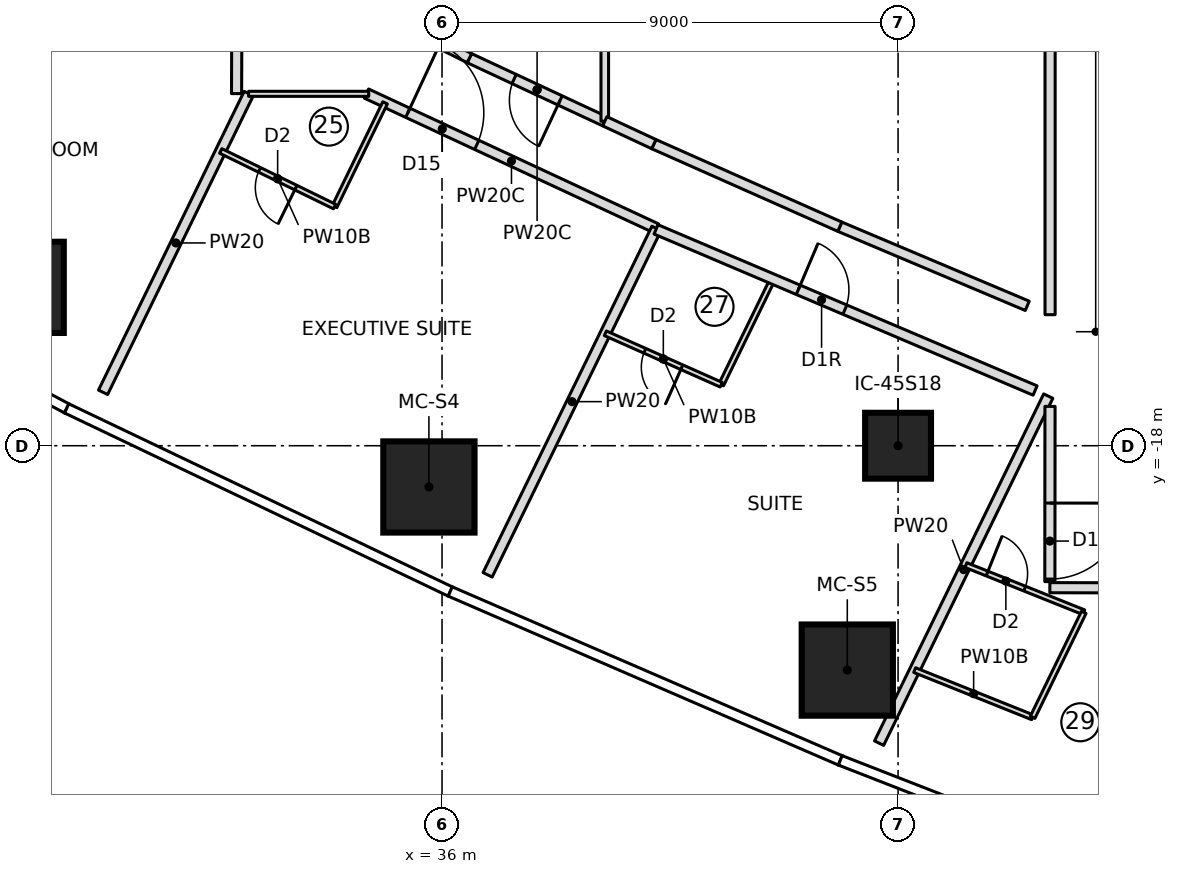
"""IFC4 building model, lengths in metres.
Left out: names, types, materials, properties, quantities, classifications, styles, units other than length and angle.
Written with IfcOpenShell. Run it as: python <this file> out.ifc"""

import sys

from ifc_helpers import new_model, si_unit, direction, frame, frame_2d, origin, origin_2d, place, context, subcontext, project, spatial, rectangle, extrude, element, fill, save


model = new_model("IFC4")
c1 = context("Model", 3, precision=1e-05, world=origin(), true_north=direction((0.0, 1.0)))
c2 = subcontext(c1, "Body", "Model", "MODEL_VIEW")
j1 = project(units=[si_unit("LENGTHUNIT", "METRE"), si_unit("PLANEANGLEUNIT", "RADIAN")], contexts=[c1])
p1 = place(None, origin())
s1 = spatial("IfcSite", under=j1, at=p1, CompositionType="ELEMENT")
p2 = place(p1, origin())
s2 = spatial("IfcBuilding", under=s1, at=p2, CompositionType="ELEMENT")
p3 = place(p2, frame((0.0, 0.0, 53.8)))
s3 = spatial("IfcBuildingStorey", under=s2, at=p3, CompositionType="ELEMENT", Elevation=53.8)
for number, where, z_axis, x_axis in (
    (1, (27.635, -14.874, 0.0), (0.0, 0.0, 1.0), (1.0, 0.0, 0.0)),
    (2, (35.741, -18.814, 0.0), (0.0, 0.0, 1.0), (1.0, 0.0, 0.0)),
    (3, (43.998, -22.428, 0.0), (0.0, 0.0, 1.0), (1.0, 0.0, 0.0)),
):
    element("IfcColumn", number, at=place(p3, frame(where, z_axis=z_axis, x_axis=x_axis)), inside=s3, PredefinedType="COLUMN", context=c2, shape_type="SweptSolid", body=[
        extrude(rectangle(XDim=1.8, YDim=1.8, at=origin_2d()), origin(), (0.0, 0.0, 1.0), 3.55),
    ])
p4 = place(p3, frame((45.0, -18.0, 0.0), z_axis=(0.0, 0.0, 1.0), x_axis=(1.0, 0.0, 0.0)))
e4 = element("IfcColumn", 4, at=p4, inside=s3, PredefinedType="COLUMN", context=c2, shape_type="SweptSolid", body=[
    extrude(rectangle(XDim=1.3, YDim=1.3, at=origin_2d()), origin(), (0.0, 0.0, 1.0), 3.55),
])
p5 = place(p3, frame((29.31, -16.946, 0.0), z_axis=(0.0, 0.0, 1.0), x_axis=(0.438228560869, 0.898863576099, 0.0)))
e5 = element("IfcWall", 5, at=p5, inside=s3, PredefinedType="PARTITIONING", context=c2, shape_type="SweptSolid", body=[
    extrude(rectangle(XDim=6.559, YDim=0.2, at=frame_2d((3.28, 0.0))), origin(), (0.0, 0.0, 1.0), 3.25),
])
p6 = place(p3, frame((34.509, -11.05, 0.0), z_axis=(0.0, 0.0, 1.0), x_axis=(0.906710104698, -0.421754414368, 0.0)))
e6 = element("IfcWall", 6, at=p6, inside=s3, PredefinedType="PARTITIONING", context=c2, shape_type="SweptSolid", body=[
    extrude(rectangle(XDim=6.312, YDim=0.2, at=frame_2d((3.156, 0.0))), origin(), (0.0, 0.0, 1.0), 3.25),
])
p7 = place(p6, frame((0.9, 0.0, 0.0)))
e7 = element("IfcOpeningElement", 7, at=p7, cuts=e6, PredefinedType="OPENING", context=c2, shape_type="SweptSolid", body=[
    extrude(rectangle(XDim=1.5, YDim=2.1, at=frame_2d((0.75, 1.05))), frame((0.0, 0.11, 0.0), z_axis=(0.0, -1.0, 0.0), x_axis=(1.0, 0.0, 0.0)), (0.0, 0.0, 1.0), 0.22),
])
p8 = place(p3, frame((34.877, -11.233, 0.0), z_axis=(0.0, 0.0, 1.0), x_axis=(-0.438227154656, -0.898864261678, 0.0)))
e8 = element("IfcWall", 8, at=p8, inside=s3, PredefinedType="PARTITIONING", context=c2, shape_type="SweptSolid", body=[
    extrude(rectangle(XDim=2.277, YDim=0.1, at=frame_2d((1.138, 0.0))), origin(), (0.0, 0.0, 1.0), 3.25),
])
p9 = place(p3, frame((33.879, -13.28, 0.0), z_axis=(0.0, 0.0, 1.0), x_axis=(-0.89845285455, 0.439070003702, 0.0)))
e9 = element("IfcWall", 9, at=p9, inside=s3, PredefinedType="PARTITIONING", context=c2, shape_type="SweptSolid", body=[
    extrude(rectangle(XDim=2.5, YDim=0.1, at=frame_2d((1.25, 0.0))), origin(), (0.0, 0.0, 1.0), 3.25),
])
p10 = place(p9, frame((0.85, 0.0, 0.0)))
e10 = element("IfcOpeningElement", 10, at=p10, cuts=e9, PredefinedType="OPENING", context=c2, shape_type="SweptSolid", body=[
    extrude(rectangle(XDim=0.8, YDim=2.1, at=frame_2d((0.4, 1.05))), frame((0.0, 0.06, 0.0), z_axis=(0.0, -1.0, 0.0), x_axis=(1.0, 0.0, 0.0)), (0.0, 0.0, 1.0), 0.12),
])
p11 = place(p3, frame((36.899, -20.548, 0.0), z_axis=(0.0, 0.0, 1.0), x_axis=(0.438202247191, 0.898876404494, 0.0)))
e11 = element("IfcWall", 11, at=p11, inside=s3, PredefinedType="PARTITIONING", context=c2, shape_type="SweptSolid", body=[
    extrude(rectangle(XDim=7.605, YDim=0.2, at=frame_2d((3.802, 0.0))), origin(), (0.0, 0.0, 1.0), 3.25),
])
p12 = place(p3, frame((42.508, -14.748, 0.0), z_axis=(0.0, 0.0, 1.0), x_axis=(-0.4381470535, -0.898903309321, 0.0)))
e12 = element("IfcWall", 12, at=p12, inside=s3, PredefinedType="PARTITIONING", context=c2, shape_type="SweptSolid", body=[
    extrude(rectangle(XDim=2.278, YDim=0.1, at=frame_2d((1.139, 0.0))), origin(), (0.0, 0.0, 1.0), 3.25),
])
p13 = place(p3, frame((41.51, -16.796, 0.0), z_axis=(0.0, 0.0, 1.0), x_axis=(-0.914000607553, 0.405712816401, 0.0)))
e13 = element("IfcWall", 13, at=p13, inside=s3, PredefinedType="PARTITIONING", context=c2, shape_type="SweptSolid", body=[
    extrude(rectangle(XDim=2.501, YDim=0.1, at=frame_2d((1.251, 0.0))), origin(), (0.0, 0.0, 1.0), 3.25),
])
p14 = place(p13, frame((0.85, 0.0, 0.0)))
e14 = element("IfcOpeningElement", 14, at=p14, cuts=e13, PredefinedType="OPENING", context=c2, shape_type="SweptSolid", body=[
    extrude(rectangle(XDim=0.8, YDim=2.1, at=frame_2d((0.4, 1.05))), frame((0.0, 0.06, 0.0), z_axis=(0.0, -1.0, 0.0), x_axis=(1.0, 0.0, 0.0)), (0.0, 0.0, 1.0), 0.12),
])
p15 = place(p3, frame((44.625, -23.87, 0.0), z_axis=(0.0, 0.0, 1.0), x_axis=(0.438207101073, 0.898874038211, 0.0)))
e15 = element("IfcWall", 15, at=p15, inside=s3, PredefinedType="PARTITIONING", context=c2, shape_type="SweptSolid", body=[
    extrude(rectangle(XDim=7.62, YDim=0.2, at=frame_2d((3.81, 0.0))), origin(), (0.0, 0.0, 1.0), 3.25),
])
p16 = place(p3, frame((47.655, -23.361, 0.0), z_axis=(0.0, 0.0, 1.0), x_axis=(-0.928288495333, 0.371860819975, 0.0)))
e16 = element("IfcWall", 16, at=p16, inside=s3, PredefinedType="PARTITIONING", context=c2, shape_type="SweptSolid", body=[
    extrude(rectangle(XDim=2.507, YDim=0.1, at=frame_2d((1.253, 0.0))), origin(), (0.0, 0.0, 1.0), 3.25),
])
p17 = place(p3, frame((46.338, -20.355, 0.0), z_axis=(0.0, 0.0, 1.0), x_axis=(0.928288495333, -0.371860819975, 0.0)))
e17 = element("IfcWall", 17, at=p17, inside=s3, PredefinedType="PARTITIONING", context=c2, shape_type="SweptSolid", body=[
    extrude(rectangle(XDim=2.507, YDim=0.1, at=frame_2d((1.253, 0.0))), origin(), (0.0, 0.0, 1.0), 3.25),
])
p18 = place(p17, frame((0.45, 0.0, 0.0)))
e18 = element("IfcOpeningElement", 18, at=p18, cuts=e17, PredefinedType="OPENING", context=c2, shape_type="SweptSolid", body=[
    extrude(rectangle(XDim=0.8, YDim=2.1, at=frame_2d((0.4, 1.05))), frame((0.0, 0.06, 0.0), z_axis=(0.0, -1.0, 0.0), x_axis=(1.0, 0.0, 0.0)), (0.0, 0.0, 1.0), 0.12),
])
p19 = place(p3, frame((48.665, -21.288, 0.0), z_axis=(0.0, 0.0, 1.0), x_axis=(-0.438171240168, -0.898891519756, 0.0)))
e19 = element("IfcWall", 19, at=p19, inside=s3, PredefinedType="PARTITIONING", context=c2, shape_type="SweptSolid", body=[
    extrude(rectangle(XDim=2.306, YDim=0.1, at=frame_2d((1.153, 0.0))), origin(), (0.0, 0.0, 1.0), 3.25),
])
p20 = place(p3, frame((39.212, -11.597, 0.0), z_axis=(0.0, 0.0, 1.0), x_axis=(-0.906348100281, 0.422531798943, 0.0)))
e20 = element("IfcWall", 20, at=p20, inside=s3, PredefinedType="PARTITIONING", context=c2, shape_type="SweptSolid", body=[
    extrude(rectangle(XDim=2.948, YDim=0.2, at=frame_2d((1.474, 0.0))), origin(), (0.0, 0.0, 1.0), 3.25),
])
p21 = place(p20, frame((0.974, 0.0, 0.0)))
e21 = element("IfcOpeningElement", 21, at=p21, cuts=e20, PredefinedType="OPENING", context=c2, shape_type="SweptSolid", body=[
    extrude(rectangle(XDim=1.0, YDim=2.1, at=frame_2d((0.5, 1.05))), frame((0.0, 0.11, 0.0), z_axis=(0.0, -1.0, 0.0), x_axis=(1.0, 0.0, 0.0)), (0.0, 0.0, 1.0), 0.22),
])
p22 = place(p3, frame((39.212, -11.597, 0.0), z_axis=(0.0, 0.0, 1.0), x_axis=(0.0, 1.0, 0.0)))
e22 = element("IfcWall", 22, at=p22, inside=s3, PredefinedType="PARTITIONING", context=c2, shape_type="SweptSolid", body=[
    extrude(rectangle(XDim=23.193, YDim=0.15, at=frame_2d((11.597, 0.0))), origin(), (0.0, 0.0, 1.0), 3.25),
])
p23 = place(p3, frame((47.55, -15.239, 0.0), z_axis=(0.0, 0.0, 1.0), x_axis=(-0.921269894054, 0.388923877269, 0.0)))
e23 = element("IfcWall", 23, at=p23, inside=s3, PredefinedType="PARTITIONING", context=c2, shape_type="SweptSolid", body=[
    extrude(rectangle(XDim=4.016, YDim=0.2, at=frame_2d((2.008, 0.0))), origin(), (0.0, 0.0, 1.0), 3.25),
])
p24 = place(p3, frame((43.85, -13.677, 0.0), z_axis=(0.0, 0.0, 1.0), x_axis=(-0.913986953061, 0.405743576209, 0.0)))
e24 = element("IfcWall", 24, at=p24, inside=s3, PredefinedType="PARTITIONING", context=c2, shape_type="SweptSolid", body=[
    extrude(rectangle(XDim=4.016, YDim=0.2, at=frame_2d((2.008, 0.0))), origin(), (0.0, 0.0, 1.0), 3.25),
])
p25 = place(p3, frame((40.18, -12.048, 0.0), z_axis=(0.0, 0.0, 1.0), x_axis=(-0.906346628109, 0.422534956797, 0.0)))
e25 = element("IfcWall", 25, at=p25, inside=s3, PredefinedType="PARTITIONING", context=c2, shape_type="SweptSolid", body=[
    extrude(rectangle(XDim=1.068, YDim=0.2, at=frame_2d((0.534, 0.0))), origin(), (0.0, 0.0, 1.0), 3.25),
])
p26 = place(p3, frame((32.182, -11.055, 0.0), z_axis=(0.0, 0.0, 1.0), x_axis=(1.0, 0.0, 0.0)))
e26 = element("IfcWall", 26, at=p26, inside=s3, PredefinedType="PARTITIONING", context=c2, shape_type="SweptSolid", body=[
    extrude(rectangle(XDim=2.371, YDim=0.1, at=frame_2d((1.186, 0.0))), origin(), (0.0, 0.0, 1.0), 3.25),
])
p27 = place(p3, frame((40.223, -13.73, 0.0), z_axis=(0.0, 0.0, 1.0), x_axis=(0.920292261621, -0.391231585127, 0.0)))
e27 = element("IfcWall", 27, at=p27, inside=s3, PredefinedType="PARTITIONING", context=c2, shape_type="SweptSolid", body=[
    extrude(rectangle(XDim=8.129, YDim=0.2, at=frame_2d((4.064, 0.0))), origin(), (0.0, 0.0, 1.0), 3.25),
])
p28 = place(p27, frame((3.05, 0.0, 0.0)))
e28 = element("IfcOpeningElement", 28, at=p28, cuts=e27, PredefinedType="OPENING", context=c2, shape_type="SweptSolid", body=[
    extrude(rectangle(XDim=1.0, YDim=2.1, at=frame_2d((0.5, 1.05))), frame((0.0, 0.11, 0.0), z_axis=(0.0, -1.0, 0.0), x_axis=(1.0, 0.0, 0.0)), (0.0, 0.0, 1.0), 0.22),
])
p29 = place(p3, frame((48.0, 15.414, 0.0), z_axis=(0.0, 0.0, 1.0), x_axis=(0.0, -1.0, 0.0)))
e29 = element("IfcWall", 29, at=p29, inside=s3, PredefinedType="PARTITIONING", context=c2, shape_type="SweptSolid", body=[
    extrude(rectangle(XDim=30.828, YDim=0.2, at=frame_2d((15.414, 0.0))), origin(), (0.0, 0.0, 1.0), 3.25),
])
p30 = place(p3, frame((31.95, -9.77, 0.0), z_axis=(0.0, 0.0, 1.0), x_axis=(-0.003811674235, -0.999992735543, 0.0)))
e30 = element("IfcWall", 30, at=p30, inside=s3, PredefinedType="PARTITIONING", context=c2, shape_type="SweptSolid", body=[
    extrude(rectangle(XDim=1.281, YDim=0.2, at=frame_2d((0.641, 0.0))), origin(), (0.0, 0.0, 1.0), 3.25),
])
p31 = place(p3, frame((47.995, -20.802, 0.0), z_axis=(0.0, 0.0, 1.0), x_axis=(0.999998104399, -0.001947099992, 0.0)))
e31 = element("IfcWall", 31, at=p31, inside=s3, PredefinedType="PARTITIONING", context=c2, shape_type="SweptSolid", body=[
    extrude(rectangle(XDim=1.505, YDim=0.2, at=frame_2d((0.752, 0.0))), origin(), (0.0, 0.0, 1.0), 3.25),
])
p32 = place(p3, frame((36.54, -10.351, 0.0), z_axis=(0.0, 0.0, 1.0), x_axis=(-0.894337154042, 0.447393624116, 0.0)))
e32 = element("IfcWall", 32, at=p32, inside=s3, PredefinedType="PARTITIONING", context=c2, shape_type="SweptSolid", body=[
    extrude(rectangle(XDim=0.542, YDim=0.2, at=frame_2d((0.271, 0.0))), origin(), (0.0, 0.0, 1.0), 3.25),
])
p33 = place(p3, frame((47.999, -17.224, 0.0), z_axis=(0.0, 0.0, 1.0), x_axis=(-0.000847217996, -0.999999641111, 0.0)))
e33 = element("IfcWall", 33, at=p33, inside=s3, PredefinedType="PARTITIONING", context=c2, shape_type="SweptSolid", body=[
    extrude(rectangle(XDim=3.458, YDim=0.2, at=frame_2d((1.729, 0.0))), origin(), (0.0, 0.0, 1.0), 3.25),
])
p34 = place(p33, frame((1.908, 0.0, 0.0)))
e34 = element("IfcOpeningElement", 34, at=p34, cuts=e33, PredefinedType="OPENING", context=c2, shape_type="SweptSolid", body=[
    extrude(rectangle(XDim=1.5, YDim=2.1, at=frame_2d((0.75, 1.05))), frame((0.0, 0.11, 0.0), z_axis=(0.0, -1.0, 0.0), x_axis=(1.0, 0.0, 0.0)), (0.0, 0.0, 1.0), 0.22),
])
p35 = place(p10, origin())
e35 = element("IfcDoor", 35, at=p35, inside=s3, OperationType="SINGLE_SWING_LEFT", PredefinedType="DOOR", context=c2, shape_type="SweptSolid", body=[
    extrude(rectangle(XDim=0.8, YDim=2.1, at=frame_2d((0.4, 1.05))), frame((0.0, 0.025, 0.0), z_axis=(0.0, -1.0, 0.0), x_axis=(1.0, 0.0, 0.0)), (0.0, 0.0, 1.0), 0.05),
])
fill(e10, e35)
p36 = place(p7, origin())
e36 = element("IfcDoor", 36, at=p36, inside=s3, OperationType="DOUBLE_DOOR_SINGLE_SWING", PredefinedType="DOOR", context=c2, shape_type="SweptSolid", body=[
    extrude(rectangle(XDim=1.5, YDim=2.1, at=frame_2d((0.75, 1.05))), frame((0.0, 0.025, 0.0), z_axis=(0.0, -1.0, 0.0), x_axis=(1.0, 0.0, 0.0)), (0.0, 0.0, 1.0), 0.05),
])
fill(e7, e36)
p37 = place(p14, origin())
e37 = element("IfcDoor", 37, at=p37, inside=s3, OperationType="SINGLE_SWING_LEFT", PredefinedType="DOOR", context=c2, shape_type="SweptSolid", body=[
    extrude(rectangle(XDim=0.8, YDim=2.1, at=frame_2d((0.4, 1.05))), frame((0.0, 0.025, 0.0), z_axis=(0.0, -1.0, 0.0), x_axis=(1.0, 0.0, 0.0)), (0.0, 0.0, 1.0), 0.05),
])
fill(e14, e37)
p38 = place(p28, origin())
e38 = element("IfcDoor", 38, at=p38, inside=s3, OperationType="SINGLE_SWING_RIGHT", PredefinedType="DOOR", context=c2, shape_type="SweptSolid", body=[
    extrude(rectangle(XDim=1.0, YDim=2.1, at=frame_2d((0.5, 1.05))), frame((0.0, 0.025, 0.0), z_axis=(0.0, -1.0, 0.0), x_axis=(1.0, 0.0, 0.0)), (0.0, 0.0, 1.0), 0.05),
])
fill(e28, e38)
p39 = place(p18, origin())
e39 = element("IfcDoor", 39, at=p39, inside=s3, OperationType="SINGLE_SWING_LEFT", PredefinedType="DOOR", context=c2, shape_type="SweptSolid", body=[
    extrude(rectangle(XDim=0.8, YDim=2.1, at=frame_2d((0.4, 1.05))), frame((0.0, 0.025, 0.0), z_axis=(0.0, -1.0, 0.0), x_axis=(1.0, 0.0, 0.0)), (0.0, 0.0, 1.0), 0.05),
])
fill(e18, e39)
p40 = place(p21, origin())
e40 = element("IfcDoor", 40, at=p40, inside=s3, OperationType="SINGLE_SWING_RIGHT", PredefinedType="DOOR", context=c2, shape_type="SweptSolid", body=[
    extrude(rectangle(XDim=1.0, YDim=2.1, at=frame_2d((0.5, 1.05))), frame((0.0, 0.025, 0.0), z_axis=(0.0, -1.0, 0.0), x_axis=(1.0, 0.0, 0.0)), (0.0, 0.0, 1.0), 0.05),
])
fill(e21, e40)
p41 = place(p34, origin())
e41 = element("IfcDoor", 41, at=p41, inside=s3, OperationType="DOUBLE_DOOR_SINGLE_SWING", PredefinedType="DOOR", context=c2, shape_type="SweptSolid", body=[
    extrude(rectangle(XDim=1.5, YDim=2.1, at=frame_2d((0.75, 1.05))), frame((0.0, 0.025, 0.0), z_axis=(0.0, -1.0, 0.0), x_axis=(1.0, 0.0, 0.0)), (0.0, 0.0, 1.0), 0.05),
])
fill(e34, e41)
save(model, sys.argv[1])
